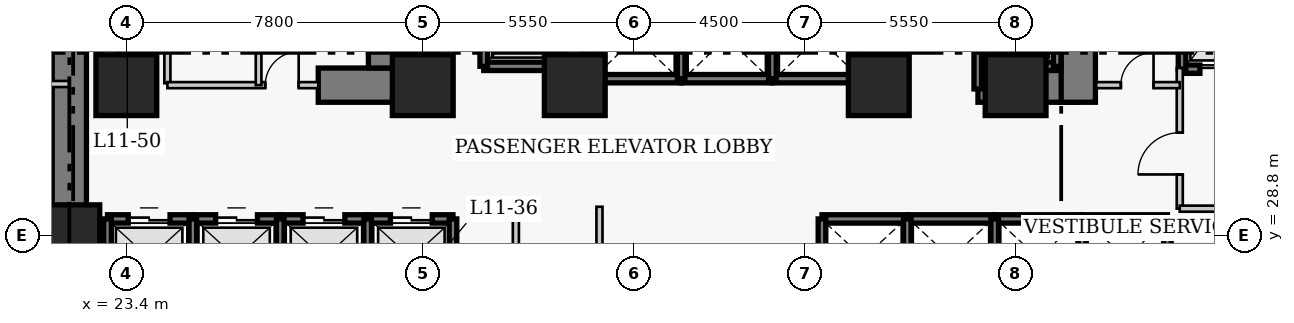
"""IFC4 building model, lengths in metres.
Left out: names, types, materials, properties, quantities, classifications, styles, units other than length and angle.
Written with IfcOpenShell. Run it as: python <this file> out.ifc"""

import sys

from ifc_helpers import new_model, si_unit, direction, frame, frame_2d, origin, origin_2d, place, context, subcontext, project, spatial, rectangle, extrude, element, fill, save


model = new_model("IFC4")
c1 = context("Model", 3, precision=1e-05, world=origin(), true_north=direction((0.0, 1.0)))
c2 = subcontext(c1, "Body", "Model", "MODEL_VIEW")
j1 = project(units=[si_unit("LENGTHUNIT", "METRE"), si_unit("PLANEANGLEUNIT", "RADIAN")], contexts=[c1])
p1 = place(None, origin())
s1 = spatial("IfcSite", under=j1, at=p1, CompositionType="ELEMENT")
p2 = place(p1, origin())
s2 = spatial("IfcBuilding", under=s1, at=p2, CompositionType="ELEMENT")
p3 = place(p2, frame((0.0, 0.0, 48.8)))
s3 = spatial("IfcBuildingStorey", under=s2, at=p3, CompositionType="ELEMENT", Elevation=48.8)
p4 = place(p3, frame((21.9, 27.05, 0.0), z_axis=(0.0, 0.0, 1.0), x_axis=(0.0, 1.0, 0.0)))
e1 = element("IfcWall", 1, at=p4, inside=s3, PredefinedType="SHEAR", context=c2, shape_type="SweptSolid", body=[
    extrude(rectangle(XDim=13.72, YDim=0.9, at=frame_2d((6.86, 0.0))), origin(), (0.0, 0.0, 1.0), 3.8),
])
p5 = place(p3, frame((28.45, 32.75, 0.0), z_axis=(0.0, 0.0, 1.0), x_axis=(1.0, 0.0, 0.0)))
e2 = element("IfcWall", 2, at=p5, inside=s3, PredefinedType="SHEAR", context=c2, shape_type="SweptSolid", body=[
    extrude(rectangle(XDim=2.4, YDim=0.9, at=frame_2d((1.2, 0.0))), origin(), (0.0, 0.0, 1.0), 3.8),
])
p6 = place(p3, frame((45.81, 32.75, 0.0), z_axis=(0.0, 0.0, 1.0), x_axis=(1.0, 0.0, 0.0)))
e3 = element("IfcWall", 3, at=p6, inside=s3, PredefinedType="SHEAR", context=c2, shape_type="SweptSolid", body=[
    extrude(rectangle(XDim=2.64, YDim=0.9, at=frame_2d((1.32, 0.0))), origin(), (0.0, 0.0, 1.0), 3.8),
])
p7 = place(p3, frame((30.22, 33.2, 0.0), z_axis=(0.0, 0.0, 1.0), x_axis=(0.0, 1.0, 0.0)))
e4 = element("IfcWall", 4, at=p7, inside=s3, PredefinedType="SHEAR", context=c2, shape_type="SweptSolid", body=[
    extrude(rectangle(XDim=7.12, YDim=0.9, at=frame_2d((3.56, 0.0))), origin(), (0.0, 0.0, 1.0), 3.8),
])
p8 = place(p3, frame((48.45, 32.3, 0.0), z_axis=(0.0, 0.0, 1.0), x_axis=(0.0, 1.0, 0.0)))
e5 = element("IfcWall", 5, at=p8, inside=s3, PredefinedType="SHEAR", context=c2, shape_type="SweptSolid", body=[
    extrude(rectangle(XDim=8.02, YDim=0.9, at=frame_2d((4.01, 0.0))), origin(), (0.0, 0.0, 1.0), 3.8),
])
p9 = place(p8, frame((5.9, 0.0, 0.0)))
e6 = element("IfcOpeningElement", 6, at=p9, cuts=e5, PredefinedType="OPENING", context=c2, shape_type="SweptSolid", body=[
    extrude(rectangle(XDim=1.1, YDim=2.15, at=frame_2d((0.55, 1.075))), frame((0.0, 0.46, 0.0), z_axis=(0.0, -1.0, 0.0), x_axis=(1.0, 0.0, 0.0)), (0.0, 0.0, 1.0), 0.92),
])
for number, where, z_axis, x_axis in (
    (7, (21.9, 28.8, 0.0), (0.0, 0.0, 1.0), (1.0, 0.0, 0.0)),
    (8, (23.4, 32.75, 0.0), (0.0, 0.0, 1.0), (1.0, 0.0, 0.0)),
    (9, (31.2, 32.75, 0.0), (0.0, 0.0, 1.0), (1.0, 0.0, 0.0)),
    (10, (35.2, 32.75, 0.0), (0.0, 0.0, 1.0), (1.0, 0.0, 0.0)),
    (11, (43.2, 32.75, 0.0), (0.0, 0.0, 1.0), (1.0, 0.0, 0.0)),
    (12, (46.8, 32.75, 0.0), (0.0, 0.0, 1.0), (1.0, 0.0, 0.0)),
):
    element("IfcColumn", number, at=place(p3, frame(where, z_axis=z_axis, x_axis=x_axis)), inside=s3, PredefinedType="COLUMN", context=c2, shape_type="SweptSolid", body=[
        extrude(rectangle(XDim=1.6, YDim=1.6, at=origin_2d()), origin(), (0.0, 0.0, 1.0), 3.8),
    ])
p10 = place(p3, frame((22.905, 29.23, 0.0), z_axis=(0.0, 0.0, 1.0), x_axis=(1.0, 0.0, 0.0)))
e13 = element("IfcWall", 13, at=p10, inside=s3, PredefinedType="SHEAR", context=c2, shape_type="SweptSolid", body=[
    extrude(rectangle(XDim=2.245, YDim=0.22, at=frame_2d((1.123, 0.0))), origin(), (0.0, 0.0, 1.0), 3.8),
])
p11 = place(p10, frame((0.545, 0.0, 0.0)))
e14 = element("IfcOpeningElement", 14, at=p11, cuts=e13, PredefinedType="OPENING", context=c2, shape_type="SweptSolid", body=[
    extrude(rectangle(XDim=1.1, YDim=2.15, at=frame_2d((0.55, 1.075))), frame((0.0, 0.12, 0.0), z_axis=(0.0, -1.0, 0.0), x_axis=(1.0, 0.0, 0.0)), (0.0, 0.0, 1.0), 0.24),
])
p12 = place(p3, frame((22.905, 27.17, 0.0), z_axis=(0.0, 0.0, 1.0), x_axis=(0.0, 1.0, 0.0)))
e15 = element("IfcWall", 15, at=p12, inside=s3, PredefinedType="SHEAR", context=c2, shape_type="SweptSolid", body=[
    extrude(rectangle(XDim=2.06, YDim=0.2, at=frame_2d((1.03, 0.0))), origin(), (0.0, 0.0, 1.0), 3.8),
])
p13 = place(p3, frame((25.15, 29.23, 0.0), z_axis=(0.0, 0.0, 1.0), x_axis=(1.0, 0.0, 0.0)))
e16 = element("IfcWall", 16, at=p13, inside=s3, PredefinedType="SHEAR", context=c2, shape_type="SweptSolid", body=[
    extrude(rectangle(XDim=2.3, YDim=0.22, at=frame_2d((1.15, 0.0))), origin(), (0.0, 0.0, 1.0), 3.8),
])
p14 = place(p13, frame((0.6, 0.0, 0.0)))
e17 = element("IfcOpeningElement", 17, at=p14, cuts=e16, PredefinedType="OPENING", context=c2, shape_type="SweptSolid", body=[
    extrude(rectangle(XDim=1.1, YDim=2.15, at=frame_2d((0.55, 1.075))), frame((0.0, 0.12, 0.0), z_axis=(0.0, -1.0, 0.0), x_axis=(1.0, 0.0, 0.0)), (0.0, 0.0, 1.0), 0.24),
])
p15 = place(p3, frame((25.15, 27.17, 0.0), z_axis=(0.0, 0.0, 1.0), x_axis=(0.0, 1.0, 0.0)))
e18 = element("IfcWall", 18, at=p15, inside=s3, PredefinedType="SHEAR", context=c2, shape_type="SweptSolid", body=[
    extrude(rectangle(XDim=2.06, YDim=0.2, at=frame_2d((1.03, 0.0))), origin(), (0.0, 0.0, 1.0), 3.8),
])
p16 = place(p3, frame((27.45, 29.23, 0.0), z_axis=(0.0, 0.0, 1.0), x_axis=(1.0, 0.0, 0.0)))
e19 = element("IfcWall", 19, at=p16, inside=s3, PredefinedType="SHEAR", context=c2, shape_type="SweptSolid", body=[
    extrude(rectangle(XDim=2.3, YDim=0.22, at=frame_2d((1.15, 0.0))), origin(), (0.0, 0.0, 1.0), 3.8),
])
p17 = place(p16, frame((0.6, 0.0, 0.0)))
e20 = element("IfcOpeningElement", 20, at=p17, cuts=e19, PredefinedType="OPENING", context=c2, shape_type="SweptSolid", body=[
    extrude(rectangle(XDim=1.1, YDim=2.15, at=frame_2d((0.55, 1.075))), frame((0.0, 0.12, 0.0), z_axis=(0.0, -1.0, 0.0), x_axis=(1.0, 0.0, 0.0)), (0.0, 0.0, 1.0), 0.24),
])
p18 = place(p3, frame((27.45, 27.17, 0.0), z_axis=(0.0, 0.0, 1.0), x_axis=(0.0, 1.0, 0.0)))
e21 = element("IfcWall", 21, at=p18, inside=s3, PredefinedType="SHEAR", context=c2, shape_type="SweptSolid", body=[
    extrude(rectangle(XDim=2.06, YDim=0.2, at=frame_2d((1.03, 0.0))), origin(), (0.0, 0.0, 1.0), 3.8),
])
p19 = place(p3, frame((29.75, 29.23, 0.0), z_axis=(0.0, 0.0, 1.0), x_axis=(1.0, 0.0, 0.0)))
e22 = element("IfcWall", 22, at=p19, inside=s3, PredefinedType="SHEAR", context=c2, shape_type="SweptSolid", body=[
    extrude(rectangle(XDim=2.245, YDim=0.22, at=frame_2d((1.123, 0.0))), origin(), (0.0, 0.0, 1.0), 3.8),
])
p20 = place(p19, frame((0.6, 0.0, 0.0)))
e23 = element("IfcOpeningElement", 23, at=p20, cuts=e22, PredefinedType="OPENING", context=c2, shape_type="SweptSolid", body=[
    extrude(rectangle(XDim=1.1, YDim=2.15, at=frame_2d((0.55, 1.075))), frame((0.0, 0.12, 0.0), z_axis=(0.0, -1.0, 0.0), x_axis=(1.0, 0.0, 0.0)), (0.0, 0.0, 1.0), 0.24),
])
for number, where, z_axis, x_axis in (
    (24, (29.75, 27.17, 0.0), (0.0, 0.0, 1.0), (0.0, 1.0, 0.0)),
    (25, (31.995, 27.17, 0.0), (0.0, 0.0, 1.0), (0.0, 1.0, 0.0)),
):
    element("IfcWall", number, at=place(p3, frame(where, z_axis=z_axis, x_axis=x_axis)), inside=s3, PredefinedType="SHEAR", context=c2, shape_type="SweptSolid", body=[
        extrude(rectangle(XDim=2.06, YDim=0.2, at=frame_2d((1.03, 0.0))), origin(), (0.0, 0.0, 1.0), 3.8),
    ])
p21 = place(p3, frame((41.705, 29.23, 0.0), z_axis=(0.0, 0.0, 1.0), x_axis=(1.0, 0.0, 0.0)))
e26 = element("IfcWall", 26, at=p21, inside=s3, PredefinedType="SHEAR", context=c2, shape_type="SweptSolid", body=[
    extrude(rectangle(XDim=2.245, YDim=0.22, at=frame_2d((1.123, 0.0))), origin(), (0.0, 0.0, 1.0), 3.8),
])
p22 = place(p3, frame((41.705, 27.17, 0.0), z_axis=(0.0, 0.0, 1.0), x_axis=(0.0, 1.0, 0.0)))
e27 = element("IfcWall", 27, at=p22, inside=s3, PredefinedType="SHEAR", context=c2, shape_type="SweptSolid", body=[
    extrude(rectangle(XDim=2.06, YDim=0.2, at=frame_2d((1.03, 0.0))), origin(), (0.0, 0.0, 1.0), 3.8),
])
p23 = place(p3, frame((43.95, 29.23, 0.0), z_axis=(0.0, 0.0, 1.0), x_axis=(1.0, 0.0, 0.0)))
e28 = element("IfcWall", 28, at=p23, inside=s3, PredefinedType="SHEAR", context=c2, shape_type="SweptSolid", body=[
    extrude(rectangle(XDim=2.3, YDim=0.22, at=frame_2d((1.15, 0.0))), origin(), (0.0, 0.0, 1.0), 3.8),
])
p24 = place(p3, frame((43.95, 27.17, 0.0), z_axis=(0.0, 0.0, 1.0), x_axis=(0.0, 1.0, 0.0)))
e29 = element("IfcWall", 29, at=p24, inside=s3, PredefinedType="SHEAR", context=c2, shape_type="SweptSolid", body=[
    extrude(rectangle(XDim=2.06, YDim=0.2, at=frame_2d((1.03, 0.0))), origin(), (0.0, 0.0, 1.0), 3.8),
])
p25 = place(p3, frame((46.25, 29.23, 0.0), z_axis=(0.0, 0.0, 1.0), x_axis=(1.0, 0.0, 0.0)))
e30 = element("IfcWall", 30, at=p25, inside=s3, PredefinedType="SHEAR", context=c2, shape_type="SweptSolid", body=[
    extrude(rectangle(XDim=2.3, YDim=0.22, at=frame_2d((1.15, 0.0))), origin(), (0.0, 0.0, 1.0), 3.8),
])
p26 = place(p3, frame((46.25, 27.17, 0.0), z_axis=(0.0, 0.0, 1.0), x_axis=(0.0, 1.0, 0.0)))
e31 = element("IfcWall", 31, at=p26, inside=s3, PredefinedType="SHEAR", context=c2, shape_type="SweptSolid", body=[
    extrude(rectangle(XDim=2.06, YDim=0.2, at=frame_2d((1.03, 0.0))), origin(), (0.0, 0.0, 1.0), 3.8),
])
p27 = place(p3, frame((48.55, 29.23, 0.0), z_axis=(0.0, 0.0, 1.0), x_axis=(1.0, 0.0, 0.0)))
e32 = element("IfcWall", 32, at=p27, inside=s3, PredefinedType="SHEAR", context=c2, shape_type="SweptSolid", body=[
    extrude(rectangle(XDim=2.245, YDim=0.22, at=frame_2d((1.123, 0.0))), origin(), (0.0, 0.0, 1.0), 3.8),
])
for number, where, z_axis, x_axis in (
    (33, (48.55, 27.17, 0.0), (0.0, 0.0, 1.0), (0.0, 1.0, 0.0)),
    (34, (50.795, 27.17, 0.0), (0.0, 0.0, 1.0), (0.0, 1.0, 0.0)),
):
    element("IfcWall", number, at=place(p3, frame(where, z_axis=z_axis, x_axis=x_axis)), inside=s3, PredefinedType="SHEAR", context=c2, shape_type="SweptSolid", body=[
        extrude(rectangle(XDim=2.06, YDim=0.2, at=frame_2d((1.03, 0.0))), origin(), (0.0, 0.0, 1.0), 3.8),
    ])
p28 = place(p3, frame((35.68, 32.92, 0.0), z_axis=(0.0, 0.0, 1.0), x_axis=(1.0, 0.0, 0.0)))
e35 = element("IfcWall", 35, at=p28, inside=s3, PredefinedType="SHEAR", context=c2, shape_type="SweptSolid", body=[
    extrude(rectangle(XDim=2.32, YDim=0.22, at=frame_2d((1.16, 0.0))), origin(), (0.0, 0.0, 1.0), 3.8),
])
p29 = place(p3, frame((35.68, 32.92, 0.0), z_axis=(0.0, 0.0, 1.0), x_axis=(0.0, 1.0, 0.0)))
e36 = element("IfcWall", 36, at=p29, inside=s3, PredefinedType="SHEAR", context=c2, shape_type="SweptSolid", body=[
    extrude(rectangle(XDim=2.16, YDim=0.2, at=frame_2d((1.08, 0.0))), origin(), (0.0, 0.0, 1.0), 3.8),
])
p30 = place(p3, frame((38.0, 32.92, 0.0), z_axis=(0.0, 0.0, 1.0), x_axis=(1.0, 0.0, 0.0)))
e37 = element("IfcWall", 37, at=p30, inside=s3, PredefinedType="SHEAR", context=c2, shape_type="SweptSolid", body=[
    extrude(rectangle(XDim=2.4, YDim=0.22, at=frame_2d((1.2, 0.0))), origin(), (0.0, 0.0, 1.0), 3.8),
])
p31 = place(p3, frame((38.0, 32.92, 0.0), z_axis=(0.0, 0.0, 1.0), x_axis=(0.0, 1.0, 0.0)))
e38 = element("IfcWall", 38, at=p31, inside=s3, PredefinedType="SHEAR", context=c2, shape_type="SweptSolid", body=[
    extrude(rectangle(XDim=2.16, YDim=0.2, at=frame_2d((1.08, 0.0))), origin(), (0.0, 0.0, 1.0), 3.8),
])
p32 = place(p3, frame((40.4, 32.92, 0.0), z_axis=(0.0, 0.0, 1.0), x_axis=(1.0, 0.0, 0.0)))
e39 = element("IfcWall", 39, at=p32, inside=s3, PredefinedType="SHEAR", context=c2, shape_type="SweptSolid", body=[
    extrude(rectangle(XDim=2.32, YDim=0.22, at=frame_2d((1.16, 0.0))), origin(), (0.0, 0.0, 1.0), 3.8),
])
for number, where, z_axis, x_axis in (
    (40, (40.4, 32.92, 0.0), (0.0, 0.0, 1.0), (0.0, 1.0, 0.0)),
    (41, (42.72, 32.92, 0.0), (0.0, 0.0, 1.0), (0.0, 1.0, 0.0)),
):
    element("IfcWall", number, at=place(p3, frame(where, z_axis=z_axis, x_axis=x_axis)), inside=s3, PredefinedType="SHEAR", context=c2, shape_type="SweptSolid", body=[
        extrude(rectangle(XDim=2.16, YDim=0.2, at=frame_2d((1.08, 0.0))), origin(), (0.0, 0.0, 1.0), 3.8),
    ])
p33 = place(p3, frame((51.18, 33.17, 0.0), z_axis=(0.0, 0.0, 1.0), x_axis=(1.0, 0.0, 0.0)))
e42 = element("IfcWall", 42, at=p33, inside=s3, PredefinedType="SHEAR", context=c2, shape_type="SweptSolid", body=[
    extrude(rectangle(XDim=2.42, YDim=0.22, at=frame_2d((1.21, 0.0))), origin(), (0.0, 0.0, 1.0), 3.8),
])
p34 = place(p33, frame((0.47, 0.0, 0.0)))
e43 = element("IfcOpeningElement", 43, at=p34, cuts=e42, PredefinedType="OPENING", context=c2, shape_type="SweptSolid", body=[
    extrude(rectangle(XDim=1.3, YDim=2.15, at=frame_2d((0.65, 1.075))), frame((0.0, 0.12, 0.0), z_axis=(0.0, -1.0, 0.0), x_axis=(1.0, 0.0, 0.0)), (0.0, 0.0, 1.0), 0.24),
])
p35 = place(p3, frame((51.18, 33.17, 0.0), z_axis=(0.0, 0.0, 1.0), x_axis=(0.0, 1.0, 0.0)))
e44 = element("IfcWall", 44, at=p35, inside=s3, PredefinedType="SHEAR", context=c2, shape_type="SweptSolid", body=[
    extrude(rectangle(XDim=2.86, YDim=0.2, at=frame_2d((1.43, 0.0))), origin(), (0.0, 0.0, 1.0), 3.8),
])
p36 = place(p3, frame((32.805, 33.245, 0.0), z_axis=(0.0, 0.0, 1.0), x_axis=(1.0, 0.0, 0.0)))
e45 = element("IfcWall", 45, at=p36, inside=s3, PredefinedType="SHEAR", context=c2, shape_type="SweptSolid", body=[
    extrude(rectangle(XDim=2.09, YDim=0.22, at=frame_2d((1.045, 0.0))), origin(), (0.0, 0.0, 1.0), 3.8),
])
for number, where, z_axis, x_axis in (
    (46, (32.805, 33.245, 0.0), (0.0, 0.0, 1.0), (0.0, 1.0, 0.0)),
    (47, (34.895, 33.245, 0.0), (0.0, 0.0, 1.0), (0.0, 1.0, 0.0)),
):
    element("IfcWall", number, at=place(p3, frame(where, z_axis=z_axis, x_axis=x_axis)), inside=s3, PredefinedType="SHEAR", context=c2, shape_type="SweptSolid", body=[
        extrude(rectangle(XDim=2.91, YDim=0.2, at=frame_2d((1.455, 0.0))), origin(), (0.0, 0.0, 1.0), 3.8),
    ])
p37 = place(p3, frame((45.805, 33.245, 0.0), z_axis=(0.0, 0.0, 1.0), x_axis=(1.0, 0.0, 0.0)))
e48 = element("IfcWall", 48, at=p37, inside=s3, PredefinedType="SHEAR", context=c2, shape_type="SweptSolid", body=[
    extrude(rectangle(XDim=2.09, YDim=0.22, at=frame_2d((1.045, 0.0))), origin(), (0.0, 0.0, 1.0), 3.8),
])
p38 = place(p3, frame((45.805, 32.65, 0.0), z_axis=(0.0, 0.0, 1.0), x_axis=(0.0, 1.0, 0.0)))
e49 = element("IfcWall", 49, at=p38, inside=s3, PredefinedType="SHEAR", context=c2, shape_type="SweptSolid", body=[
    extrude(rectangle(XDim=3.505, YDim=0.2, at=frame_2d((1.752, 0.0))), origin(), (0.0, 0.0, 1.0), 3.8),
])
p39 = place(p3, frame((47.895, 33.245, 0.0), z_axis=(0.0, 0.0, 1.0), x_axis=(0.0, 1.0, 0.0)))
e50 = element("IfcWall", 50, at=p39, inside=s3, PredefinedType="SHEAR", context=c2, shape_type="SweptSolid", body=[
    extrude(rectangle(XDim=2.91, YDim=0.2, at=frame_2d((1.455, 0.0))), origin(), (0.0, 0.0, 1.0), 3.8),
])
p40 = place(p3, frame((24.48, 32.8, 0.0), z_axis=(0.0, 0.0, 1.0), x_axis=(0.0, 1.0, 0.0)))
e51 = element("IfcWall", 51, at=p40, inside=s3, PredefinedType="PARTITIONING", context=c2, shape_type="SweptSolid", body=[
    extrude(rectangle(XDim=3.57, YDim=0.16, at=frame_2d((1.785, 0.0))), origin(), (0.0, 0.0, 1.0), 3.54),
])
p41 = place(p40, frame((1.604, 0.0, 0.0)))
e52 = element("IfcOpeningElement", 52, at=p41, cuts=e51, PredefinedType="OPENING", context=c2, shape_type="SweptSolid", body=[
    extrude(rectangle(XDim=0.9, YDim=2.1, at=frame_2d((0.45, 1.05))), frame((0.0, 0.09, 0.0), z_axis=(0.0, -1.0, 0.0), x_axis=(1.0, 0.0, 0.0)), (0.0, 0.0, 1.0), 0.18),
])
p42 = place(p3, frame((51.12, 29.5, 0.0), z_axis=(0.0, 0.0, 1.0), x_axis=(0.0, 1.0, 0.0)))
e53 = element("IfcWall", 53, at=p42, inside=s3, PredefinedType="PARTITIONING", context=c2, shape_type="SweptSolid", body=[
    extrude(rectangle(XDim=3.7, YDim=0.16, at=frame_2d((1.85, 0.0))), origin(), (0.0, 0.0, 1.0), 3.54),
])
p43 = place(p42, frame((0.9, 0.0, 0.0)))
e54 = element("IfcOpeningElement", 54, at=p43, cuts=e53, PredefinedType="OPENING", context=c2, shape_type="SweptSolid", body=[
    extrude(rectangle(XDim=1.1, YDim=2.15, at=frame_2d((0.55, 1.075))), frame((0.0, 0.09, 0.0), z_axis=(0.0, -1.0, 0.0), x_axis=(1.0, 0.0, 0.0)), (0.0, 0.0, 1.0), 0.18),
])
p44 = place(p3, frame((51.12, 29.5, 0.0), z_axis=(0.0, 0.0, 1.0), x_axis=(1.0, 0.0, 0.0)))
e55 = element("IfcWall", 55, at=p44, inside=s3, PredefinedType="PARTITIONING", context=c2, shape_type="SweptSolid", body=[
    extrude(rectangle(XDim=5.63, YDim=0.16, at=frame_2d((2.815, 0.0))), origin(), (0.0, 0.0, 1.0), 3.54),
])
p45 = place(p3, frame((24.48, 32.75, 0.0), z_axis=(0.0, 0.0, 1.0), x_axis=(1.0, 0.0, 0.0)))
e56 = element("IfcWall", 56, at=p45, inside=s3, PredefinedType="PARTITIONING", context=c2, shape_type="SweptSolid", body=[
    extrude(rectangle(XDim=3.97, YDim=0.16, at=frame_2d((1.985, 0.0))), origin(), (0.0, 0.0, 1.0), 3.54),
])
p46 = place(p45, frame((2.575, 0.0, 0.0)))
e57 = element("IfcOpeningElement", 57, at=p46, cuts=e56, PredefinedType="OPENING", context=c2, shape_type="SweptSolid", body=[
    extrude(rectangle(XDim=0.88, YDim=2.05, at=frame_2d((0.44, 1.025))), frame((0.0, 0.09, 0.0), z_axis=(0.0, -1.0, 0.0), x_axis=(1.0, 0.0, 0.0)), (0.0, 0.0, 1.0), 0.18),
])
p47 = place(p3, frame((48.92, 32.75, 0.0), z_axis=(0.0, 0.0, 1.0), x_axis=(1.0, 0.0, 0.0)))
e58 = element("IfcWall", 58, at=p47, inside=s3, PredefinedType="PARTITIONING", context=c2, shape_type="SweptSolid", body=[
    extrude(rectangle(XDim=2.2, YDim=0.16, at=frame_2d((1.1, 0.0))), origin(), (0.0, 0.0, 1.0), 3.54),
])
p48 = place(p47, frame((0.65, 0.0, 0.0)))
e59 = element("IfcOpeningElement", 59, at=p48, cuts=e58, PredefinedType="OPENING", context=c2, shape_type="SweptSolid", body=[
    extrude(rectangle(XDim=0.86, YDim=2.05, at=frame_2d((0.43, 1.025))), frame((0.0, 0.09, 0.0), z_axis=(0.0, -1.0, 0.0), x_axis=(1.0, 0.0, 0.0)), (0.0, 0.0, 1.0), 0.18),
])
p49 = place(p3, frame((26.88, 32.75, 0.0), z_axis=(0.0, 0.0, 1.0), x_axis=(0.0, 1.0, 0.0)))
e60 = element("IfcWall", 60, at=p49, inside=s3, PredefinedType="PARTITIONING", context=c2, shape_type="SweptSolid", body=[
    extrude(rectangle(XDim=3.62, YDim=0.15, at=frame_2d((1.81, 0.0))), origin(), (0.0, 0.0, 1.0), 3.54),
])
for number, where, z_axis, x_axis in (
    (61, (33.65, 25.31, 0.0), (0.0, 0.0, 1.0), (0.0, 1.0, 0.0)),
    (62, (35.85, 25.31, 0.0), (0.0, 0.0, 1.0), (0.0, 1.0, 0.0)),
):
    element("IfcWall", number, at=place(p3, frame(where, z_axis=z_axis, x_axis=x_axis)), inside=s3, PredefinedType="PARTITIONING", context=c2, shape_type="SweptSolid", body=[
        extrude(rectangle(XDim=4.24, YDim=0.16, at=frame_2d((2.12, 0.0))), origin(), (0.0, 0.0, 1.0), 3.54),
    ])
p50 = place(p3, frame((19.96, 32.78, 0.0), z_axis=(0.0, 0.0, 1.0), x_axis=(1.0, 0.0, 0.0)))
e63 = element("IfcWall", 63, at=p50, inside=s3, PredefinedType="PARTITIONING", context=c2, shape_type="SweptSolid", body=[
    extrude(rectangle(XDim=1.94, YDim=0.16, at=frame_2d((0.97, 0.0))), origin(), (0.0, 0.0, 1.0), 3.54),
])
p51 = place(p11, origin())
e64 = element("IfcDoor", 64, at=p51, inside=s3, OperationType="DOUBLE_DOOR_SLIDING", PredefinedType="DOOR", context=c2, shape_type="SweptSolid", body=[
    extrude(rectangle(XDim=1.1, YDim=2.15, at=frame_2d((0.55, 1.075))), frame((0.0, 0.025, 0.0), z_axis=(0.0, -1.0, 0.0), x_axis=(1.0, 0.0, 0.0)), (0.0, 0.0, 1.0), 0.05),
])
fill(e14, e64)
p52 = place(p14, origin())
e65 = element("IfcDoor", 65, at=p52, inside=s3, OperationType="DOUBLE_DOOR_SLIDING", PredefinedType="DOOR", context=c2, shape_type="SweptSolid", body=[
    extrude(rectangle(XDim=1.1, YDim=2.15, at=frame_2d((0.55, 1.075))), frame((0.0, 0.025, 0.0), z_axis=(0.0, -1.0, 0.0), x_axis=(1.0, 0.0, 0.0)), (0.0, 0.0, 1.0), 0.05),
])
fill(e17, e65)
p53 = place(p17, origin())
e66 = element("IfcDoor", 66, at=p53, inside=s3, OperationType="DOUBLE_DOOR_SLIDING", PredefinedType="DOOR", context=c2, shape_type="SweptSolid", body=[
    extrude(rectangle(XDim=1.1, YDim=2.15, at=frame_2d((0.55, 1.075))), frame((0.0, 0.025, 0.0), z_axis=(0.0, -1.0, 0.0), x_axis=(1.0, 0.0, 0.0)), (0.0, 0.0, 1.0), 0.05),
])
fill(e20, e66)
p54 = place(p20, origin())
e67 = element("IfcDoor", 67, at=p54, inside=s3, OperationType="DOUBLE_DOOR_SLIDING", PredefinedType="DOOR", context=c2, shape_type="SweptSolid", body=[
    extrude(rectangle(XDim=1.1, YDim=2.15, at=frame_2d((0.55, 1.075))), frame((0.0, 0.025, 0.0), z_axis=(0.0, -1.0, 0.0), x_axis=(1.0, 0.0, 0.0)), (0.0, 0.0, 1.0), 0.05),
])
fill(e23, e67)
p55 = place(p34, origin())
e68 = element("IfcDoor", 68, at=p55, inside=s3, OperationType="DOUBLE_DOOR_SLIDING", PredefinedType="DOOR", context=c2, shape_type="SweptSolid", body=[
    extrude(rectangle(XDim=1.3, YDim=2.15, at=frame_2d((0.65, 1.075))), frame((0.0, 0.025, 0.0), z_axis=(0.0, -1.0, 0.0), x_axis=(1.0, 0.0, 0.0)), (0.0, 0.0, 1.0), 0.05),
])
fill(e43, e68)
p56 = place(p43, origin())
e69 = element("IfcDoor", 69, at=p56, inside=s3, OperationType="SINGLE_SWING_LEFT", PredefinedType="DOOR", context=c2, shape_type="SweptSolid", body=[
    extrude(rectangle(XDim=1.1, YDim=2.15, at=frame_2d((0.55, 1.075))), frame((0.0, 0.025, 0.0), z_axis=(0.0, -1.0, 0.0), x_axis=(1.0, 0.0, 0.0)), (0.0, 0.0, 1.0), 0.05),
])
fill(e54, e69)
p57 = place(p46, origin())
e70 = element("IfcDoor", 70, at=p57, inside=s3, OperationType="SINGLE_SWING_RIGHT", PredefinedType="DOOR", context=c2, shape_type="SweptSolid", body=[
    extrude(rectangle(XDim=0.88, YDim=2.05, at=frame_2d((0.44, 1.025))), frame((0.0, 0.025, 0.0), z_axis=(0.0, -1.0, 0.0), x_axis=(1.0, 0.0, 0.0)), (0.0, 0.0, 1.0), 0.05),
])
fill(e57, e70)
p58 = place(p48, origin())
e71 = element("IfcDoor", 71, at=p58, inside=s3, OperationType="SINGLE_SWING_RIGHT", PredefinedType="DOOR", context=c2, shape_type="SweptSolid", body=[
    extrude(rectangle(XDim=0.86, YDim=2.05, at=frame_2d((0.43, 1.025))), frame((0.0, 0.025, 0.0), z_axis=(0.0, -1.0, 0.0), x_axis=(1.0, 0.0, 0.0)), (0.0, 0.0, 1.0), 0.05),
])
fill(e59, e71)
save(model, sys.argv[1])
